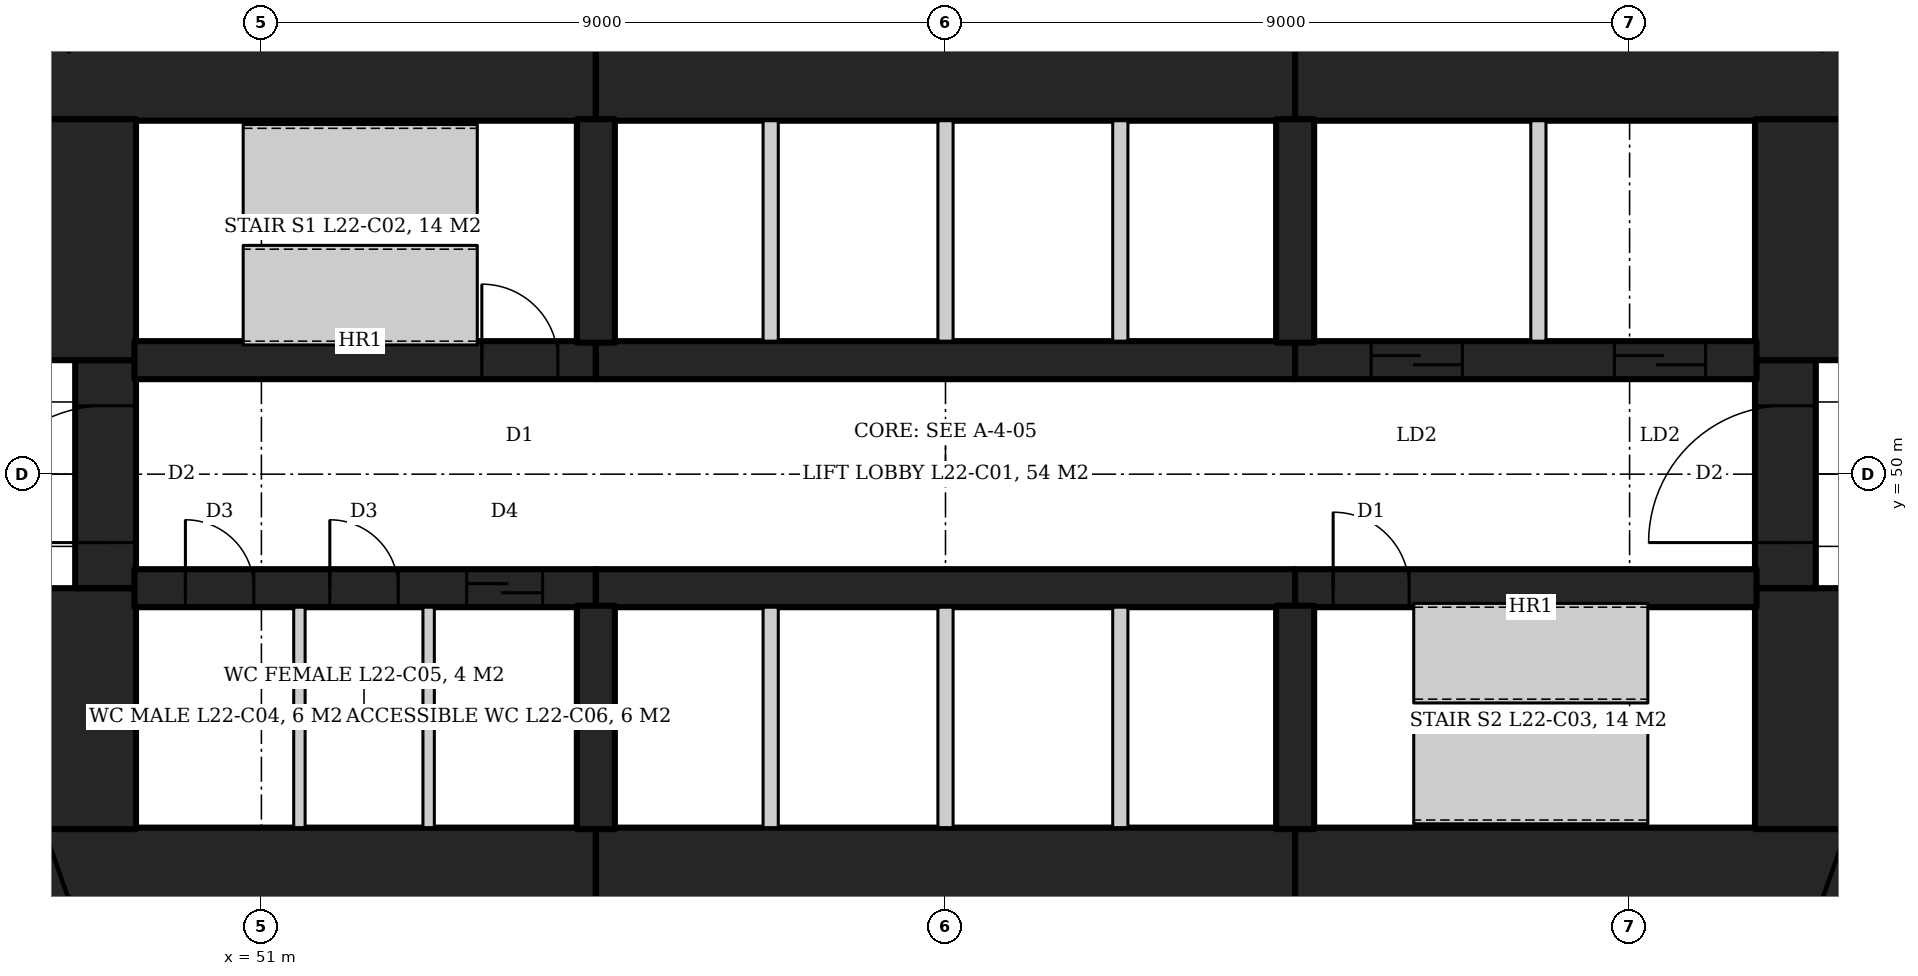
"""IFC4 building model, lengths in metres.
Left out: names, types, materials, properties, quantities, classifications, styles, units other than length and angle.
Written with IfcOpenShell. Run it as: python <this file> out.ifc"""

import sys

from ifc_helpers import new_model, si_unit, direction, frame, frame_2d, origin, place, context, subcontext, project, spatial, rectangle, extrude, element, fill, save


model = new_model("IFC4")
c1 = context("Model", 3, precision=1e-05, world=origin(), true_north=direction((0.0, 1.0)))
c2 = subcontext(c1, "Body", "Model", "MODEL_VIEW")
j1 = project(units=[si_unit("LENGTHUNIT", "METRE"), si_unit("PLANEANGLEUNIT", "RADIAN")], contexts=[c1])
p1 = place(None, origin())
s1 = spatial("IfcSite", under=j1, at=p1, CompositionType="ELEMENT")
p2 = place(p1, origin())
s2 = spatial("IfcBuilding", under=s1, at=p2, CompositionType="ELEMENT")
p3 = place(p2, frame((0.0, 0.0, 101.6)))
s3 = spatial("IfcBuildingStorey", under=s2, at=p3, CompositionType="ELEMENT", Elevation=101.6)
p4 = place(p3, frame((47.55, 55.55, 0.0), z_axis=(0.0, 0.0, 1.0), x_axis=(1.0, 0.0, 0.0)))
e1 = element("IfcWall", 1, at=p4, inside=s3, PredefinedType="SHEAR", context=c2, shape_type="SweptSolid", body=[
    extrude(rectangle(XDim=7.85, YDim=1.8, at=frame_2d((3.925, 0.0))), origin(), (0.0, 0.0, 1.0), 4.2),
])
p5 = place(p3, frame((55.4, 55.55, 0.0), z_axis=(0.0, 0.0, 1.0), x_axis=(1.0, 0.0, 0.0)))
e2 = element("IfcWall", 2, at=p5, inside=s3, PredefinedType="SHEAR", context=c2, shape_type="SweptSolid", body=[
    extrude(rectangle(XDim=9.2, YDim=1.8, at=frame_2d((4.6, 0.0))), origin(), (0.0, 0.0, 1.0), 4.2),
])
for number, where, z_axis, x_axis in (
    (3, (64.6, 55.55, 0.0), (0.0, 0.0, 1.0), (1.0, 0.0, 0.0)),
    (4, (47.55, 44.45, 0.0), (0.0, 0.0, 1.0), (1.0, 0.0, 0.0)),
):
    element("IfcWall", number, at=place(p3, frame(where, z_axis=z_axis, x_axis=x_axis)), inside=s3, PredefinedType="SHEAR", context=c2, shape_type="SweptSolid", body=[
        extrude(rectangle(XDim=7.85, YDim=1.8, at=frame_2d((3.925, 0.0))), origin(), (0.0, 0.0, 1.0), 4.2),
    ])
p6 = place(p3, frame((55.4, 44.45, 0.0), z_axis=(0.0, 0.0, 1.0), x_axis=(1.0, 0.0, 0.0)))
e5 = element("IfcWall", 5, at=p6, inside=s3, PredefinedType="SHEAR", context=c2, shape_type="SweptSolid", body=[
    extrude(rectangle(XDim=9.2, YDim=1.8, at=frame_2d((4.6, 0.0))), origin(), (0.0, 0.0, 1.0), 4.2),
])
p7 = place(p3, frame((64.6, 44.45, 0.0), z_axis=(0.0, 0.0, 1.0), x_axis=(1.0, 0.0, 0.0)))
e6 = element("IfcWall", 6, at=p7, inside=s3, PredefinedType="SHEAR", context=c2, shape_type="SweptSolid", body=[
    extrude(rectangle(XDim=7.85, YDim=1.8, at=frame_2d((3.925, 0.0))), origin(), (0.0, 0.0, 1.0), 4.2),
])
p8 = place(p3, frame((71.55, 45.33, 0.0), z_axis=(0.0, 0.0, 1.0), x_axis=(0.0, 1.0, 0.0)))
e7 = element("IfcWall", 7, at=p8, inside=s3, PredefinedType="SHEAR", context=c2, shape_type="SweptSolid", body=[
    extrude(rectangle(XDim=3.17, YDim=1.8, at=frame_2d((1.585, 0.0))), origin(), (0.0, 0.0, 1.0), 4.2),
])
p9 = place(p3, frame((71.05, 48.5, 0.0), z_axis=(0.0, 0.0, 1.0), x_axis=(0.0, 1.0, 0.0)))
e8 = element("IfcWall", 8, at=p9, inside=s3, PredefinedType="SHEAR", context=c2, shape_type="SweptSolid", body=[
    extrude(rectangle(XDim=3.0, YDim=0.8, at=frame_2d((1.5, 0.0))), origin(), (0.0, 0.0, 1.0), 4.2),
])
p10 = place(p9, frame((0.6, 0.0, 0.0)))
e9 = element("IfcOpeningElement", 9, at=p10, cuts=e8, PredefinedType="OPENING", context=c2, shape_type="SweptSolid", body=[
    extrude(rectangle(XDim=1.8, YDim=2.1, at=frame_2d((0.9, 1.05))), frame((0.0, 0.41, 0.0), z_axis=(0.0, -1.0, 0.0), x_axis=(1.0, 0.0, 0.0)), (0.0, 0.0, 1.0), 0.82),
])
for number, where, z_axis, x_axis in (
    (10, (71.55, 51.5, 0.0), (0.0, 0.0, 1.0), (0.0, 1.0, 0.0)),
    (11, (48.45, 45.33, 0.0), (0.0, 0.0, 1.0), (0.0, 1.0, 0.0)),
):
    element("IfcWall", number, at=place(p3, frame(where, z_axis=z_axis, x_axis=x_axis)), inside=s3, PredefinedType="SHEAR", context=c2, shape_type="SweptSolid", body=[
        extrude(rectangle(XDim=3.17, YDim=1.8, at=frame_2d((1.585, 0.0))), origin(), (0.0, 0.0, 1.0), 4.2),
    ])
p11 = place(p3, frame((48.95, 48.5, 0.0), z_axis=(0.0, 0.0, 1.0), x_axis=(0.0, 1.0, 0.0)))
e12 = element("IfcWall", 12, at=p11, inside=s3, PredefinedType="SHEAR", context=c2, shape_type="SweptSolid", body=[
    extrude(rectangle(XDim=3.0, YDim=0.8, at=frame_2d((1.5, 0.0))), origin(), (0.0, 0.0, 1.0), 4.2),
])
p12 = place(p11, frame((0.6, 0.0, 0.0)))
e13 = element("IfcOpeningElement", 13, at=p12, cuts=e12, PredefinedType="OPENING", context=c2, shape_type="SweptSolid", body=[
    extrude(rectangle(XDim=1.8, YDim=2.1, at=frame_2d((0.9, 1.05))), frame((0.0, 0.41, 0.0), z_axis=(0.0, -1.0, 0.0), x_axis=(1.0, 0.0, 0.0)), (0.0, 0.0, 1.0), 0.82),
])
p13 = place(p3, frame((48.45, 51.5, 0.0), z_axis=(0.0, 0.0, 1.0), x_axis=(0.0, 1.0, 0.0)))
e14 = element("IfcWall", 14, at=p13, inside=s3, PredefinedType="SHEAR", context=c2, shape_type="SweptSolid", body=[
    extrude(rectangle(XDim=3.17, YDim=1.8, at=frame_2d((1.585, 0.0))), origin(), (0.0, 0.0, 1.0), 4.2),
])
p14 = place(p3, frame((49.33, 51.5, 0.0), z_axis=(0.0, 0.0, 1.0), x_axis=(1.0, 0.0, 0.0)))
e15 = element("IfcWall", 15, at=p14, inside=s3, PredefinedType="SHEAR", context=c2, shape_type="SweptSolid", body=[
    extrude(rectangle(XDim=6.07, YDim=0.5, at=frame_2d((3.035, 0.0))), origin(), (0.0, 0.0, 1.0), 4.2),
])
p15 = place(p14, frame((4.57, 0.0, 0.0)))
e16 = element("IfcOpeningElement", 16, at=p15, cuts=e15, PredefinedType="OPENING", context=c2, shape_type="SweptSolid", body=[
    extrude(rectangle(XDim=1.0, YDim=2.1, at=frame_2d((0.5, 1.05))), frame((0.0, 0.26, 0.0), z_axis=(0.0, -1.0, 0.0), x_axis=(1.0, 0.0, 0.0)), (0.0, 0.0, 1.0), 0.52),
])
p16 = place(p3, frame((55.4, 51.5, 0.0), z_axis=(0.0, 0.0, 1.0), x_axis=(1.0, 0.0, 0.0)))
e17 = element("IfcWall", 17, at=p16, inside=s3, PredefinedType="SHEAR", context=c2, shape_type="SweptSolid", body=[
    extrude(rectangle(XDim=9.2, YDim=0.5, at=frame_2d((4.6, 0.0))), origin(), (0.0, 0.0, 1.0), 4.2),
])
p17 = place(p3, frame((64.6, 51.5, 0.0), z_axis=(0.0, 0.0, 1.0), x_axis=(1.0, 0.0, 0.0)))
e18 = element("IfcWall", 18, at=p17, inside=s3, PredefinedType="SHEAR", context=c2, shape_type="SweptSolid", body=[
    extrude(rectangle(XDim=6.07, YDim=0.5, at=frame_2d((3.035, 0.0))), origin(), (0.0, 0.0, 1.0), 4.2),
])
p18 = place(p17, frame((1.0, 0.0, 0.0)))
e19 = element("IfcOpeningElement", 19, at=p18, cuts=e18, PredefinedType="OPENING", context=c2, shape_type="SweptSolid", body=[
    extrude(rectangle(XDim=1.2, YDim=2.1, at=frame_2d((0.6, 1.05))), frame((0.0, 0.26, 0.0), z_axis=(0.0, -1.0, 0.0), x_axis=(1.0, 0.0, 0.0)), (0.0, 0.0, 1.0), 0.52),
])
p19 = place(p17, frame((4.2, 0.0, 0.0)))
e20 = element("IfcOpeningElement", 20, at=p19, cuts=e18, PredefinedType="OPENING", context=c2, shape_type="SweptSolid", body=[
    extrude(rectangle(XDim=1.2, YDim=2.1, at=frame_2d((0.6, 1.05))), frame((0.0, 0.26, 0.0), z_axis=(0.0, -1.0, 0.0), x_axis=(1.0, 0.0, 0.0)), (0.0, 0.0, 1.0), 0.52),
])
p20 = place(p3, frame((49.33, 48.5, 0.0), z_axis=(0.0, 0.0, 1.0), x_axis=(1.0, 0.0, 0.0)))
e21 = element("IfcWall", 21, at=p20, inside=s3, PredefinedType="SHEAR", context=c2, shape_type="SweptSolid", body=[
    extrude(rectangle(XDim=6.07, YDim=0.5, at=frame_2d((3.035, 0.0))), origin(), (0.0, 0.0, 1.0), 4.2),
])
p21 = place(p20, frame((0.67, 0.0, 0.0)))
e22 = element("IfcOpeningElement", 22, at=p21, cuts=e21, PredefinedType="OPENING", context=c2, shape_type="SweptSolid", body=[
    extrude(rectangle(XDim=0.9, YDim=2.1, at=frame_2d((0.45, 1.05))), frame((0.0, 0.26, 0.0), z_axis=(0.0, -1.0, 0.0), x_axis=(1.0, 0.0, 0.0)), (0.0, 0.0, 1.0), 0.52),
])
p22 = place(p20, frame((2.57, 0.0, 0.0)))
e23 = element("IfcOpeningElement", 23, at=p22, cuts=e21, PredefinedType="OPENING", context=c2, shape_type="SweptSolid", body=[
    extrude(rectangle(XDim=0.9, YDim=2.1, at=frame_2d((0.45, 1.05))), frame((0.0, 0.26, 0.0), z_axis=(0.0, -1.0, 0.0), x_axis=(1.0, 0.0, 0.0)), (0.0, 0.0, 1.0), 0.52),
])
p23 = place(p20, frame((4.37, 0.0, 0.0)))
e24 = element("IfcOpeningElement", 24, at=p23, cuts=e21, PredefinedType="OPENING", context=c2, shape_type="SweptSolid", body=[
    extrude(rectangle(XDim=1.0, YDim=2.1, at=frame_2d((0.5, 1.05))), frame((0.0, 0.26, 0.0), z_axis=(0.0, -1.0, 0.0), x_axis=(1.0, 0.0, 0.0)), (0.0, 0.0, 1.0), 0.52),
])
p24 = place(p3, frame((55.4, 48.5, 0.0), z_axis=(0.0, 0.0, 1.0), x_axis=(1.0, 0.0, 0.0)))
e25 = element("IfcWall", 25, at=p24, inside=s3, PredefinedType="SHEAR", context=c2, shape_type="SweptSolid", body=[
    extrude(rectangle(XDim=9.2, YDim=0.5, at=frame_2d((4.6, 0.0))), origin(), (0.0, 0.0, 1.0), 4.2),
])
p25 = place(p3, frame((64.6, 48.5, 0.0), z_axis=(0.0, 0.0, 1.0), x_axis=(1.0, 0.0, 0.0)))
e26 = element("IfcWall", 26, at=p25, inside=s3, PredefinedType="SHEAR", context=c2, shape_type="SweptSolid", body=[
    extrude(rectangle(XDim=6.07, YDim=0.5, at=frame_2d((3.035, 0.0))), origin(), (0.0, 0.0, 1.0), 4.2),
])
p26 = place(p25, frame((0.5, 0.0, 0.0)))
e27 = element("IfcOpeningElement", 27, at=p26, cuts=e26, PredefinedType="OPENING", context=c2, shape_type="SweptSolid", body=[
    extrude(rectangle(XDim=1.0, YDim=2.1, at=frame_2d((0.5, 1.05))), frame((0.0, 0.26, 0.0), z_axis=(0.0, -1.0, 0.0), x_axis=(1.0, 0.0, 0.0)), (0.0, 0.0, 1.0), 0.52),
])
for number, where, z_axis, x_axis in (
    (28, (55.4, 51.73, 0.0), (0.0, 0.0, 1.0), (0.0, 1.0, 0.0)),
    (29, (64.6, 51.73, 0.0), (0.0, 0.0, 1.0), (0.0, 1.0, 0.0)),
    (30, (55.4, 48.27, 0.0), (0.0, 0.0, 1.0), (0.0, -1.0, 0.0)),
    (31, (64.6, 48.27, 0.0), (0.0, 0.0, 1.0), (0.0, -1.0, 0.0)),
):
    element("IfcWall", number, at=place(p3, frame(where, z_axis=z_axis, x_axis=x_axis)), inside=s3, PredefinedType="SHEAR", context=c2, shape_type="SweptSolid", body=[
        extrude(rectangle(XDim=2.94, YDim=0.5, at=frame_2d((1.47, 0.0))), origin(), (0.0, 0.0, 1.0), 4.2),
    ])
for number, where, z_axis, x_axis in (
    (32, (57.7, 51.75, 0.0), (0.0, 0.0, 1.0), (0.0, 1.0, 0.0)),
    (33, (60.0, 51.75, 0.0), (0.0, 0.0, 1.0), (0.0, 1.0, 0.0)),
    (34, (62.3, 51.75, 0.0), (0.0, 0.0, 1.0), (0.0, 1.0, 0.0)),
    (35, (57.7, 45.35, 0.0), (0.0, 0.0, 1.0), (0.0, 1.0, 0.0)),
    (36, (60.0, 45.35, 0.0), (0.0, 0.0, 1.0), (0.0, 1.0, 0.0)),
    (37, (62.3, 45.35, 0.0), (0.0, 0.0, 1.0), (0.0, 1.0, 0.0)),
    (38, (67.8, 51.75, 0.0), (0.0, 0.0, 1.0), (0.0, 1.0, 0.0)),
):
    element("IfcWall", number, at=place(p3, frame(where, z_axis=z_axis, x_axis=x_axis)), inside=s3, PredefinedType="PARTITIONING", context=c2, shape_type="SweptSolid", body=[
        extrude(rectangle(XDim=2.9, YDim=0.2, at=frame_2d((1.45, 0.0))), origin(), (0.0, 0.0, 1.0), 4.2),
    ])
for number, where, z_axis, x_axis in (
    (39, (51.5, 45.35, 0.0), (0.0, 0.0, 1.0), (0.0, 1.0, 0.0)),
    (40, (53.2, 45.35, 0.0), (0.0, 0.0, 1.0), (0.0, 1.0, 0.0)),
):
    element("IfcWall", number, at=place(p3, frame(where, z_axis=z_axis, x_axis=x_axis)), inside=s3, PredefinedType="PARTITIONING", context=c2, shape_type="SweptSolid", body=[
        extrude(rectangle(XDim=2.9, YDim=0.15, at=frame_2d((1.45, 0.0))), origin(), (0.0, 0.0, 1.0), 4.04),
    ])
p27 = place(p15, origin())
e41 = element("IfcDoor", 41, at=p27, inside=s3, OperationType="SINGLE_SWING_LEFT", PredefinedType="DOOR", context=c2, shape_type="SweptSolid", body=[
    extrude(rectangle(XDim=1.0, YDim=2.1, at=frame_2d((0.5, 1.05))), frame((0.0, 0.025, 0.0), z_axis=(0.0, -1.0, 0.0), x_axis=(1.0, 0.0, 0.0)), (0.0, 0.0, 1.0), 0.05),
])
fill(e16, e41)
p28 = place(p26, origin())
e42 = element("IfcDoor", 42, at=p28, inside=s3, OperationType="SINGLE_SWING_LEFT", PredefinedType="DOOR", context=c2, shape_type="SweptSolid", body=[
    extrude(rectangle(XDim=1.0, YDim=2.1, at=frame_2d((0.5, 1.05))), frame((0.0, 0.025, 0.0), z_axis=(0.0, -1.0, 0.0), x_axis=(1.0, 0.0, 0.0)), (0.0, 0.0, 1.0), 0.05),
])
fill(e27, e42)
p29 = place(p18, origin())
e43 = element("IfcDoor", 43, at=p29, inside=s3, OperationType="SLIDING_TO_LEFT", PredefinedType="DOOR", context=c2, shape_type="SweptSolid", body=[
    extrude(rectangle(XDim=1.2, YDim=2.1, at=frame_2d((0.6, 1.05))), frame((0.0, 0.025, 0.0), z_axis=(0.0, -1.0, 0.0), x_axis=(1.0, 0.0, 0.0)), (0.0, 0.0, 1.0), 0.05),
])
fill(e19, e43)
p30 = place(p19, origin())
e44 = element("IfcDoor", 44, at=p30, inside=s3, OperationType="SLIDING_TO_LEFT", PredefinedType="DOOR", context=c2, shape_type="SweptSolid", body=[
    extrude(rectangle(XDim=1.2, YDim=2.1, at=frame_2d((0.6, 1.05))), frame((0.0, 0.025, 0.0), z_axis=(0.0, -1.0, 0.0), x_axis=(1.0, 0.0, 0.0)), (0.0, 0.0, 1.0), 0.05),
])
fill(e20, e44)
p31 = place(p21, origin())
e45 = element("IfcDoor", 45, at=p31, inside=s3, OperationType="SINGLE_SWING_RIGHT", PredefinedType="DOOR", context=c2, shape_type="SweptSolid", body=[
    extrude(rectangle(XDim=0.9, YDim=2.1, at=frame_2d((0.45, 1.05))), frame((0.0, 0.025, 0.0), z_axis=(0.0, -1.0, 0.0), x_axis=(1.0, 0.0, 0.0)), (0.0, 0.0, 1.0), 0.05),
])
fill(e22, e45)
p32 = place(p22, origin())
e46 = element("IfcDoor", 46, at=p32, inside=s3, OperationType="SINGLE_SWING_RIGHT", PredefinedType="DOOR", context=c2, shape_type="SweptSolid", body=[
    extrude(rectangle(XDim=0.9, YDim=2.1, at=frame_2d((0.45, 1.05))), frame((0.0, 0.025, 0.0), z_axis=(0.0, -1.0, 0.0), x_axis=(1.0, 0.0, 0.0)), (0.0, 0.0, 1.0), 0.05),
])
fill(e23, e46)
p33 = place(p23, origin())
e47 = element("IfcDoor", 47, at=p33, inside=s3, OperationType="SLIDING_TO_LEFT", PredefinedType="DOOR", context=c2, shape_type="SweptSolid", body=[
    extrude(rectangle(XDim=1.0, YDim=2.1, at=frame_2d((0.5, 1.05))), frame((0.0, 0.025, 0.0), z_axis=(0.0, -1.0, 0.0), x_axis=(1.0, 0.0, 0.0)), (0.0, 0.0, 1.0), 0.05),
])
fill(e24, e47)
p34 = place(p10, origin())
e48 = element("IfcDoor", 48, at=p34, inside=s3, OperationType="DOUBLE_DOOR_DOUBLE_SWING", PredefinedType="DOOR", context=c2, shape_type="SweptSolid", body=[
    extrude(rectangle(XDim=1.8, YDim=2.1, at=frame_2d((0.9, 1.05))), frame((0.0, 0.025, 0.0), z_axis=(0.0, -1.0, 0.0), x_axis=(1.0, 0.0, 0.0)), (0.0, 0.0, 1.0), 0.05),
])
fill(e9, e48)
p35 = place(p12, origin())
e49 = element("IfcDoor", 49, at=p35, inside=s3, OperationType="DOUBLE_DOOR_DOUBLE_SWING", PredefinedType="DOOR", context=c2, shape_type="SweptSolid", body=[
    extrude(rectangle(XDim=1.8, YDim=2.1, at=frame_2d((0.9, 1.05))), frame((0.0, 0.025, 0.0), z_axis=(0.0, -1.0, 0.0), x_axis=(1.0, 0.0, 0.0)), (0.0, 0.0, 1.0), 0.05),
])
fill(e13, e49)
save(model, sys.argv[1])
